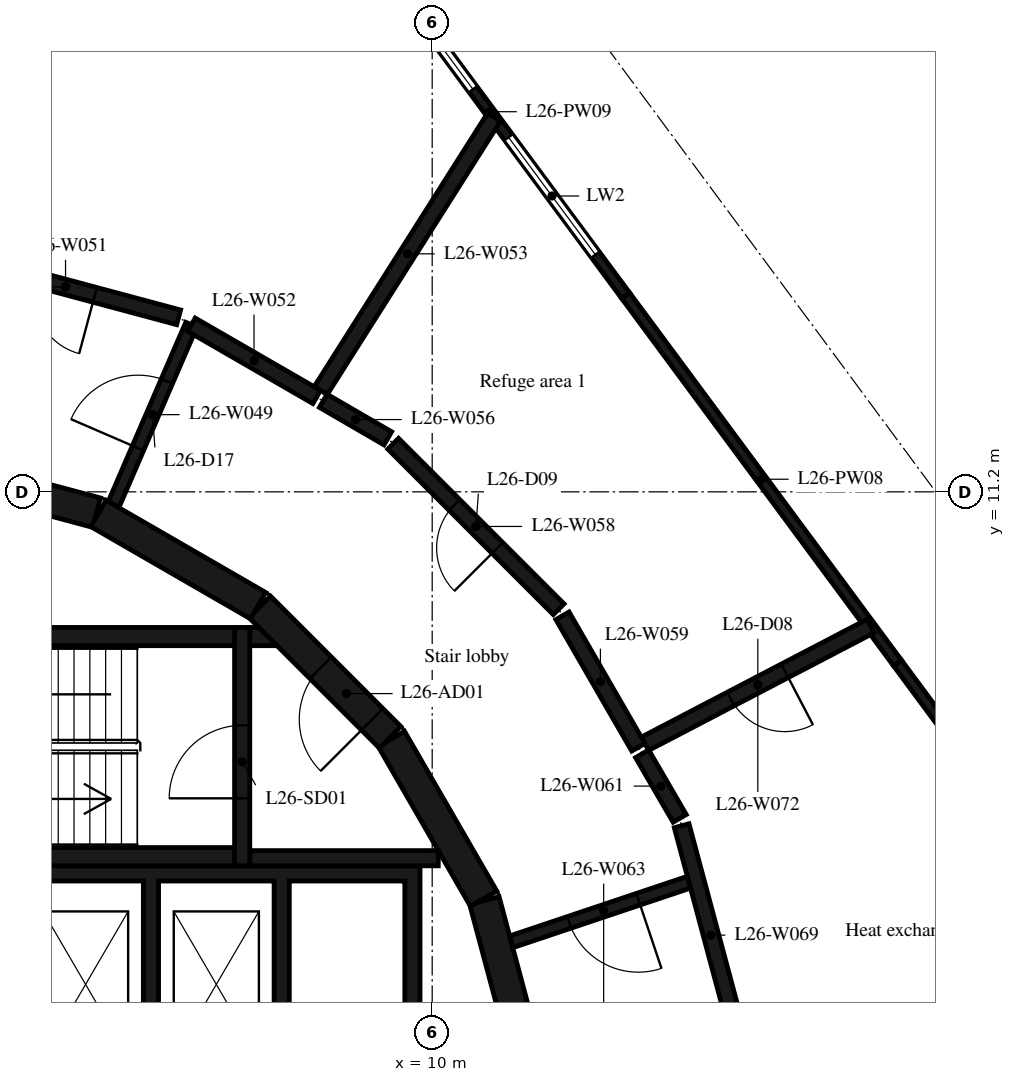
"""IFC4 building model, lengths in metres.
Left out: names, types, materials, properties, quantities, classifications, styles, units other than length and angle.
Written with IfcOpenShell. Run it as: python <this file> out.ifc"""

import sys

from ifc_helpers import new_model, si_unit, direction, frame, frame_2d, origin, place, context, subcontext, project, spatial, polyline, rectangle, outline, extrude, element, fill, save


model = new_model("IFC4")
c1 = context("Model", 3, precision=1e-05, world=origin(), true_north=direction((0.0, 1.0)))
c2 = subcontext(c1, "Body", "Model", "MODEL_VIEW")
j1 = project(units=[si_unit("LENGTHUNIT", "METRE"), si_unit("PLANEANGLEUNIT", "RADIAN")], contexts=[c1])
p1 = place(None, origin())
s1 = spatial("IfcSite", under=j1, at=p1, CompositionType="ELEMENT")
p2 = place(p1, origin())
s2 = spatial("IfcBuilding", under=s1, at=p2, CompositionType="ELEMENT")
p3 = place(p2, frame((0.0, 0.0, 108.2)))
s3 = spatial("IfcBuildingStorey", under=s2, at=p3, CompositionType="ELEMENT", Elevation=108.2)
p4 = place(p3, frame((22.125, 2.341, 0.0), z_axis=(0.0, 0.0, 1.0), x_axis=(-0.594818247684, 0.80386021933, 0.0)))
e1 = element("IfcWall", 1, at=p4, inside=s3, PredefinedType="STANDARD", context=c2, shape_type="SweptSolid", body=[
    extrude(rectangle(XDim=7.519, YDim=0.16, at=frame_2d((3.76, 0.0))), origin(), (0.0, 0.0, 1.0), 4.75),
])
p5 = place(p4, frame((2.26, 0.0, 1.0)))
e2 = element("IfcOpeningElement", 2, at=p5, cuts=e1, PredefinedType="OPENING", context=c2, shape_type="SweptSolid", body=[
    extrude(rectangle(XDim=3.0, YDim=2.2, at=frame_2d((1.5, 1.1))), frame((0.0, 0.09, 0.0), z_axis=(0.0, -1.0, 0.0), x_axis=(1.0, 0.0, 0.0)), (0.0, 0.0, 1.0), 0.18),
])
p6 = place(p3, frame((17.652, 8.385, 0.0), z_axis=(0.0, 0.0, 1.0), x_axis=(-0.594833773541, 0.803848730704, 0.0)))
e3 = element("IfcWall", 3, at=p6, inside=s3, PredefinedType="STANDARD", context=c2, shape_type="SweptSolid", body=[
    extrude(rectangle(XDim=7.519, YDim=0.16, at=frame_2d((3.759, 0.0))), origin(), (0.0, 0.0, 1.0), 4.75),
])
p7 = place(p3, frame((13.18, 14.429, 0.0), z_axis=(0.0, 0.0, 1.0), x_axis=(-0.594797265235, 0.803875744919, 0.0)))
e4 = element("IfcWall", 4, at=p7, inside=s3, PredefinedType="STANDARD", context=c2, shape_type="SweptSolid", body=[
    extrude(rectangle(XDim=7.519, YDim=0.16, at=frame_2d((3.759, 0.0))), origin(), (0.0, 0.0, 1.0), 4.75),
])
p8 = place(p7, frame((0.835, 0.0, 1.0)))
e5 = element("IfcOpeningElement", 5, at=p8, cuts=e4, PredefinedType="OPENING", context=c2, shape_type="SweptSolid", body=[
    extrude(rectangle(XDim=2.4, YDim=2.2, at=frame_2d((1.2, 1.1))), frame((0.0, 0.09, 0.0), z_axis=(0.0, -1.0, 0.0), x_axis=(1.0, 0.0, 0.0)), (0.0, 0.0, 1.0), 0.18),
])
p9 = place(p7, frame((4.219, 0.0, 1.0)))
e6 = element("IfcOpeningElement", 6, at=p9, cuts=e4, PredefinedType="OPENING", context=c2, shape_type="SweptSolid", body=[
    extrude(rectangle(XDim=2.4, YDim=2.2, at=frame_2d((1.2, 1.1))), frame((0.0, 0.09, 0.0), z_axis=(0.0, -1.0, 0.0), x_axis=(1.0, 0.0, 0.0)), (0.0, 0.0, 1.0), 0.18),
])
for number, where, z_axis, x_axis in (
    (7, (11.643, 1.55, 0.0), (0.0, 0.0, 1.0), (-0.259, 0.966, 0.0)),
    (8, (10.845, 4.51, 0.0), (0.0, 0.0, 1.0), (-0.5, 0.866, 0.0)),
):
    element("IfcWall", number, at=place(p3, frame(where, z_axis=z_axis, x_axis=x_axis)), inside=s3, PredefinedType="SHEAR", context=c2, shape_type="SweptSolid", body=[
        extrude(rectangle(XDim=3.033, YDim=0.5, at=frame_2d((1.516, 0.0))), origin(), (0.0, 0.0, 1.0), 4.75),
    ])
p10 = place(p3, frame((9.308, 7.164, 0.0), z_axis=(0.0, 0.0, 1.0), x_axis=(-0.707106781187, 0.707106781187, 0.0)))
e9 = element("IfcWall", 9, at=p10, inside=s3, PredefinedType="SHEAR", context=c2, shape_type="SweptSolid", body=[
    extrude(rectangle(XDim=3.032, YDim=0.5, at=frame_2d((1.516, 0.0))), origin(), (0.0, 0.0, 1.0), 4.75),
])
p11 = place(p10, frame((0.416, 0.0, 0.0)))
e10 = element("IfcOpeningElement", 10, at=p11, cuts=e9, PredefinedType="OPENING", context=c2, shape_type="SweptSolid", body=[
    extrude(rectangle(XDim=1.2, YDim=2.1, at=frame_2d((0.6, 1.05))), frame((0.0, 0.26, 0.0), z_axis=(0.0, -1.0, 0.0), x_axis=(1.0, 0.0, 0.0)), (0.0, 0.0, 1.0), 0.52),
])
p12 = place(p3, frame((7.137, 9.329, 0.0), z_axis=(0.0, 0.0, 1.0), x_axis=(-0.865975092491, 0.500087131594, 0.0)))
e11 = element("IfcWall", 11, at=p12, inside=s3, PredefinedType="SHEAR", context=c2, shape_type="SweptSolid", body=[
    extrude(rectangle(XDim=3.033, YDim=0.5, at=frame_2d((1.516, 0.0))), origin(), (0.0, 0.0, 1.0), 4.75),
])
p13 = place(p3, frame((4.479, 10.858, 0.0), z_axis=(0.0, 0.0, 1.0), x_axis=(-0.965948410781, 0.258734743916, 0.0)))
e12 = element("IfcWall", 12, at=p13, inside=s3, PredefinedType="SHEAR", context=c2, shape_type="SweptSolid", body=[
    extrude(rectangle(XDim=3.033, YDim=0.5, at=frame_2d((1.516, 0.0))), origin(), (0.0, 0.0, 1.0), 4.75),
])
p14 = place(p13, frame((1.016, 0.0, 0.0)))
e13 = element("IfcOpeningElement", 13, at=p14, cuts=e12, PredefinedType="OPENING", context=c2, shape_type="SweptSolid", body=[
    extrude(rectangle(XDim=1.0, YDim=2.4, at=frame_2d((0.5, 1.2))), frame((0.0, 0.26, 0.0), z_axis=(0.0, -1.0, 0.0), x_axis=(1.0, 0.0, 0.0)), (0.0, 0.0, 1.0), 0.52),
])
for number, where, z_axis, x_axis in (
    (14, (0.0, 5.2, 0.0), (0.0, 0.0, 1.0), (1.0, 0.0, 0.0)),
    (15, (0.0, 8.82, 0.0), (0.0, 0.0, 1.0), (1.0, 0.0, 0.0)),
):
    element("IfcWall", number, at=place(p3, frame(where, z_axis=z_axis, x_axis=x_axis)), inside=s3, PredefinedType="SHEAR", context=c2, shape_type="SweptSolid", body=[
        extrude(rectangle(XDim=6.75, YDim=0.3, at=frame_2d((3.375, 0.0))), origin(), (0.0, 0.0, 1.0), 4.75),
    ])
p15 = place(p3, frame((6.875, 5.05, 0.0), z_axis=(0.0, 0.0, 1.0), x_axis=(0.0, 1.0, 0.0)))
e16 = element("IfcWall", 16, at=p15, inside=s3, PredefinedType="SHEAR", context=c2, shape_type="SweptSolid", body=[
    extrude(rectangle(XDim=3.92, YDim=0.25, at=frame_2d((1.96, 0.0))), origin(), (0.0, 0.0, 1.0), 4.75),
])
p16 = place(p15, frame((1.11, 0.0, 0.0)))
e17 = element("IfcOpeningElement", 17, at=p16, cuts=e16, PredefinedType="OPENING", context=c2, shape_type="SweptSolid", body=[
    extrude(rectangle(XDim=1.2, YDim=2.1, at=frame_2d((0.6, 1.05))), frame((0.0, 0.135, 0.0), z_axis=(0.0, -1.0, 0.0), x_axis=(1.0, 0.0, 0.0)), (0.0, 0.0, 1.0), 0.27),
])
p17 = place(p3, frame((7.0, 5.175, 0.0), z_axis=(0.0, 0.0, 1.0), x_axis=(1.0, 0.0, 0.0)))
e18 = element("IfcWall", 18, at=p17, inside=s3, PredefinedType="SHEAR", context=c2, shape_type="SweptSolid", body=[
    extrude(rectangle(XDim=3.1, YDim=0.25, at=frame_2d((1.55, 0.0))), origin(), (0.0, 0.0, 1.0), 4.75),
])
p18 = place(p3, origin())
e19 = element("IfcWall", 19, at=p18, inside=s3, PredefinedType="SHEAR", context=c2, shape_type="SweptSolid", body=[
    extrude(outline(polyline([(7.448, 8.67), (7.0, 8.67), (7.0, 8.97), (7.148, 8.97), (7.448, 8.67)])), origin(), (0.0, 0.0, 1.0), 4.75),
])
p19 = place(p3, origin())
e20 = element("IfcWall", 20, at=p19, inside=s3, PredefinedType="SHEAR", context=c2, shape_type="SweptSolid", body=[
    extrude(outline(polyline([(-9.55, 4.8), (-7.65, 4.8), (-7.65, 1.9), (-7.4, 1.9), (-7.4, 4.8), (-5.5, 4.8), (-5.5, 1.9), (-5.25, 1.9), (-5.25, 4.8), (-3.35, 4.8), (-3.35, 1.9), (-3.1, 1.9), (-3.1, 4.8), (-1.2, 4.8), (-1.2, 1.9), (-0.95, 1.9), (-0.95, 4.8), (3.1, 4.8), (3.1, 1.9), (3.35, 1.9), (3.35, 4.8), (5.25, 4.8), (5.25, 1.9), (5.5, 1.9), (5.5, 4.8), (7.4, 4.8), (7.4, 1.9), (7.65, 1.9), (7.65, 4.8), (9.55, 4.8), (9.55, 1.9), (9.8, 1.9), (9.8, 4.8), (9.8, 5.05), (-9.8, 5.05), (-9.8, 4.8), (-9.8, 1.9), (-9.55, 1.9), (-9.55, 4.8)])), origin(), (0.0, 0.0, 1.0), 4.75),
])
p20 = place(p3, frame((4.76, 10.99, 0.0), z_axis=(0.0, 0.0, 1.0), x_axis=(0.396905977672, 0.917859272922, 0.0)))
e21 = element("IfcWall", 21, at=p20, inside=s3, PredefinedType="PARTITIONING", context=c2, shape_type="SweptSolid", body=[
    extrude(rectangle(XDim=3.224, YDim=0.2, at=frame_2d((1.612, 0.0))), origin(), (0.0, 0.0, 1.0), 4.75),
])
p21 = place(p20, frame((1.012, 0.0, 0.0)))
e22 = element("IfcOpeningElement", 22, at=p21, cuts=e21, PredefinedType="OPENING", context=c2, shape_type="SweptSolid", body=[
    extrude(rectangle(XDim=1.2, YDim=2.1, at=frame_2d((0.6, 1.05))), frame((0.0, 0.11, 0.0), z_axis=(0.0, -1.0, 0.0), x_axis=(1.0, 0.0, 0.0)), (0.0, 0.0, 1.0), 0.22),
])
p22 = place(p3, frame((5.83, 14.07, 0.0), z_axis=(0.0, 0.0, 1.0), x_axis=(-0.965861411942, 0.259059323171, 0.0)))
e23 = element("IfcWall", 23, at=p22, inside=s3, PredefinedType="PARTITIONING", context=c2, shape_type="SweptSolid", body=[
    extrude(rectangle(XDim=3.851, YDim=0.25, at=frame_2d((1.925, 0.0))), origin(), (0.0, 0.0, 1.0), 4.75),
])
p23 = place(p22, frame((1.425, 0.0, 0.0)))
e24 = element("IfcOpeningElement", 24, at=p23, cuts=e23, PredefinedType="OPENING", context=c2, shape_type="SweptSolid", body=[
    extrude(rectangle(XDim=1.0, YDim=2.1, at=frame_2d((0.5, 1.05))), frame((0.0, 0.135, 0.0), z_axis=(0.0, -1.0, 0.0), x_axis=(1.0, 0.0, 0.0)), (0.0, 0.0, 1.0), 0.27),
])
p24 = place(p3, frame((6.04, 13.95, 0.0), z_axis=(0.0, 0.0, 1.0), x_axis=(0.865922362496, -0.500178430292, 0.0)))
e25 = element("IfcWall", 25, at=p24, inside=s3, PredefinedType="PARTITIONING", context=c2, shape_type="SweptSolid", body=[
    extrude(rectangle(XDim=2.379, YDim=0.25, at=frame_2d((1.189, 0.0))), origin(), (0.0, 0.0, 1.0), 4.75),
])
p25 = place(p3, frame((8.167, 12.865, 0.0), z_axis=(0.0, 0.0, 1.0), x_axis=(0.535313877542, 0.84465321435, 0.0)))
e26 = element("IfcWall", 26, at=p25, inside=s3, PredefinedType="PARTITIONING", context=c2, shape_type="SweptSolid", body=[
    extrude(rectangle(XDim=5.324, YDim=0.25, at=frame_2d((2.662, 0.0))), origin(), (0.0, 0.0, 1.0), 4.75),
])
p26 = place(p3, frame((9.27, 12.08, 0.0), z_axis=(0.0, 0.0, 1.0), x_axis=(-0.864599561852, 0.502461538474, 0.0)))
e27 = element("IfcWall", 27, at=p26, inside=s3, PredefinedType="PARTITIONING", context=c2, shape_type="SweptSolid", body=[
    extrude(rectangle(XDim=1.228, YDim=0.25, at=frame_2d((0.614, 0.0))), origin(), (0.0, 0.0, 1.0), 4.75),
])
p27 = place(p3, frame((12.08, 9.27, 0.0), z_axis=(0.0, 0.0, 1.0), x_axis=(-0.707106781187, 0.707106781187, 0.0)))
e28 = element("IfcWall", 28, at=p27, inside=s3, PredefinedType="PARTITIONING", context=c2, shape_type="SweptSolid", body=[
    extrude(rectangle(XDim=3.849, YDim=0.25, at=frame_2d((1.925, 0.0))), origin(), (0.0, 0.0, 1.0), 4.75),
])
p28 = place(p27, frame((1.425, 0.0, 0.0)))
e29 = element("IfcOpeningElement", 29, at=p28, cuts=e28, PredefinedType="OPENING", context=c2, shape_type="SweptSolid", body=[
    extrude(rectangle(XDim=1.0, YDim=2.1, at=frame_2d((0.5, 1.05))), frame((0.0, 0.135, 0.0), z_axis=(0.0, -1.0, 0.0), x_axis=(1.0, 0.0, 0.0)), (0.0, 0.0, 1.0), 0.27),
])
p29 = place(p3, frame((13.39, 7.0, 0.0), z_axis=(0.0, 0.0, 1.0), x_axis=(-0.499790202325, 0.86614649665, 0.0)))
e30 = element("IfcWall", 30, at=p29, inside=s3, PredefinedType="PARTITIONING", context=c2, shape_type="SweptSolid", body=[
    extrude(rectangle(XDim=2.496, YDim=0.25, at=frame_2d((1.248, 0.0))), origin(), (0.0, 0.0, 1.0), 4.75),
])
p30 = place(p3, frame((14.07, 5.83, 0.0), z_axis=(0.0, 0.0, 1.0), x_axis=(-0.502547897079, 0.864549368828, 0.0)))
e31 = element("IfcWall", 31, at=p30, inside=s3, PredefinedType="PARTITIONING", context=c2, shape_type="SweptSolid", body=[
    extrude(rectangle(XDim=1.228, YDim=0.25, at=frame_2d((0.614, 0.0))), origin(), (0.0, 0.0, 1.0), 4.75),
])
p31 = place(p3, frame((14.34, 4.82, 0.0), z_axis=(0.0, 0.0, 1.0), x_axis=(-0.94805712629, -0.318100118345, 0.0)))
e32 = element("IfcWall", 32, at=p31, inside=s3, PredefinedType="PARTITIONING", context=c2, shape_type="SweptSolid", body=[
    extrude(rectangle(XDim=3.207, YDim=0.2, at=frame_2d((1.603, 0.0))), origin(), (0.0, 0.0, 1.0), 4.75),
])
p32 = place(p31, frame((1.003, 0.0, 0.0)))
e33 = element("IfcOpeningElement", 33, at=p32, cuts=e32, PredefinedType="OPENING", context=c2, shape_type="SweptSolid", body=[
    extrude(rectangle(XDim=1.2, YDim=2.1, at=frame_2d((0.6, 1.05))), frame((0.0, 0.11, 0.0), z_axis=(0.0, -1.0, 0.0), x_axis=(1.0, 0.0, 0.0)), (0.0, 0.0, 1.0), 0.22),
])
p33 = place(p3, frame((15.068, 2.111, 0.0), z_axis=(0.0, 0.0, 1.0), x_axis=(-0.259106201401, 0.965848837239, 0.0)))
e34 = element("IfcWall", 34, at=p33, inside=s3, PredefinedType="PARTITIONING", context=c2, shape_type="SweptSolid", body=[
    extrude(rectangle(XDim=3.726, YDim=0.25, at=frame_2d((1.863, 0.0))), origin(), (0.0, 0.0, 1.0), 4.75),
])
p34 = place(p3, frame((17.209, 8.993, 0.0), z_axis=(0.0, 0.0, 1.0), x_axis=(-0.886553621963, -0.462625848158, 0.0)))
e35 = element("IfcWall", 35, at=p34, inside=s3, PredefinedType="PARTITIONING", context=c2, shape_type="SweptSolid", body=[
    extrude(rectangle(XDim=4.183, YDim=0.25, at=frame_2d((2.091, 0.0))), origin(), (0.0, 0.0, 1.0), 4.75),
])
p35 = place(p34, frame((1.591, 0.0, 0.0)))
e36 = element("IfcOpeningElement", 36, at=p35, cuts=e35, PredefinedType="OPENING", context=c2, shape_type="SweptSolid", body=[
    extrude(rectangle(XDim=1.0, YDim=2.1, at=frame_2d((0.5, 1.05))), frame((0.0, 0.135, 0.0), z_axis=(0.0, -1.0, 0.0), x_axis=(1.0, 0.0, 0.0)), (0.0, 0.0, 1.0), 0.27),
])
p36 = place(p8, origin())
e37 = element("IfcWindow", 37, at=p36, inside=s3, PartitioningType="SINGLE_PANEL", PredefinedType="WINDOW", context=c2, shape_type="SweptSolid", body=[
    extrude(rectangle(XDim=2.4, YDim=2.2, at=frame_2d((1.2, 1.1))), frame((0.0, 0.03, 0.0), z_axis=(0.0, -1.0, 0.0), x_axis=(1.0, 0.0, 0.0)), (0.0, 0.0, 1.0), 0.06),
])
fill(e5, e37)
p37 = place(p9, origin())
e38 = element("IfcWindow", 38, at=p37, inside=s3, PartitioningType="SINGLE_PANEL", PredefinedType="WINDOW", context=c2, shape_type="SweptSolid", body=[
    extrude(rectangle(XDim=2.4, YDim=2.2, at=frame_2d((1.2, 1.1))), frame((0.0, 0.03, 0.0), z_axis=(0.0, -1.0, 0.0), x_axis=(1.0, 0.0, 0.0)), (0.0, 0.0, 1.0), 0.06),
])
fill(e6, e38)
p38 = place(p16, origin())
e39 = element("IfcDoor", 39, at=p38, inside=s3, OperationType="SINGLE_SWING_LEFT", PredefinedType="DOOR", context=c2, shape_type="SweptSolid", body=[
    extrude(rectangle(XDim=1.2, YDim=2.1, at=frame_2d((0.6, 1.05))), frame((0.0, 0.025, 0.0), z_axis=(0.0, -1.0, 0.0), x_axis=(1.0, 0.0, 0.0)), (0.0, 0.0, 1.0), 0.05),
])
fill(e17, e39)
p39 = place(p11, origin())
e40 = element("IfcDoor", 40, at=p39, inside=s3, OperationType="SINGLE_SWING_RIGHT", PredefinedType="DOOR", context=c2, shape_type="SweptSolid", body=[
    extrude(rectangle(XDim=1.2, YDim=2.1, at=frame_2d((0.6, 1.05))), frame((0.0, 0.025, 0.0), z_axis=(0.0, -1.0, 0.0), x_axis=(1.0, 0.0, 0.0)), (0.0, 0.0, 1.0), 0.05),
])
fill(e10, e40)
p40 = place(p35, origin())
e41 = element("IfcDoor", 41, at=p40, inside=s3, OperationType="SINGLE_SWING_LEFT", PredefinedType="DOOR", context=c2, shape_type="SweptSolid", body=[
    extrude(rectangle(XDim=1.0, YDim=2.1, at=frame_2d((0.5, 1.05))), frame((0.0, 0.025, 0.0), z_axis=(0.0, -1.0, 0.0), x_axis=(1.0, 0.0, 0.0)), (0.0, 0.0, 1.0), 0.05),
])
fill(e36, e41)
p41 = place(p28, origin())
e42 = element("IfcDoor", 42, at=p41, inside=s3, OperationType="SINGLE_SWING_LEFT", PredefinedType="DOOR", context=c2, shape_type="SweptSolid", body=[
    extrude(rectangle(XDim=1.0, YDim=2.1, at=frame_2d((0.5, 1.05))), frame((0.0, 0.025, 0.0), z_axis=(0.0, -1.0, 0.0), x_axis=(1.0, 0.0, 0.0)), (0.0, 0.0, 1.0), 0.05),
])
fill(e29, e42)
p42 = place(p23, origin())
e43 = element("IfcDoor", 43, at=p42, inside=s3, OperationType="SINGLE_SWING_LEFT", PredefinedType="DOOR", context=c2, shape_type="SweptSolid", body=[
    extrude(rectangle(XDim=1.0, YDim=2.1, at=frame_2d((0.5, 1.05))), frame((0.0, 0.025, 0.0), z_axis=(0.0, -1.0, 0.0), x_axis=(1.0, 0.0, 0.0)), (0.0, 0.0, 1.0), 0.05),
])
fill(e24, e43)
p43 = place(p21, origin())
e44 = element("IfcDoor", 44, at=p43, inside=s3, OperationType="SINGLE_SWING_LEFT", PredefinedType="DOOR", context=c2, shape_type="SweptSolid", body=[
    extrude(rectangle(XDim=1.2, YDim=2.1, at=frame_2d((0.6, 1.05))), frame((0.0, 0.025, 0.0), z_axis=(0.0, -1.0, 0.0), x_axis=(1.0, 0.0, 0.0)), (0.0, 0.0, 1.0), 0.05),
])
fill(e22, e44)
p44 = place(p32, origin())
e45 = element("IfcDoor", 45, at=p44, inside=s3, OperationType="SINGLE_SWING_LEFT", PredefinedType="DOOR", context=c2, shape_type="SweptSolid", body=[
    extrude(rectangle(XDim=1.2, YDim=2.1, at=frame_2d((0.6, 1.05))), frame((0.0, 0.025, 0.0), z_axis=(0.0, -1.0, 0.0), x_axis=(1.0, 0.0, 0.0)), (0.0, 0.0, 1.0), 0.05),
])
fill(e33, e45)
save(model, sys.argv[1])
